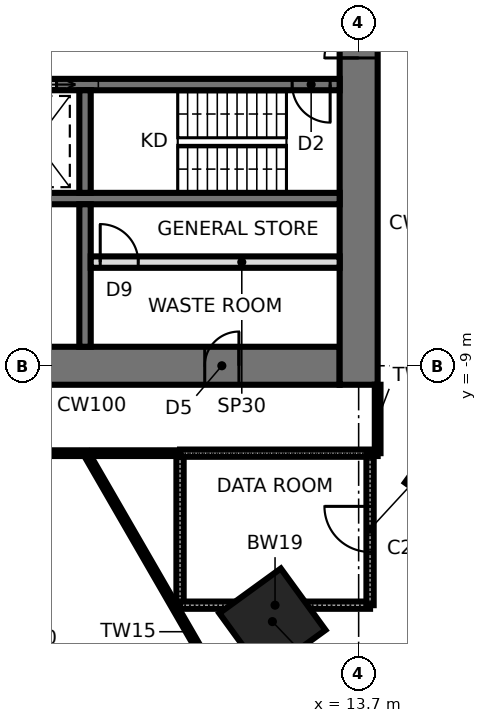
"""IFC4 building model, lengths in metres.
Left out: names, types, materials, properties, quantities, classifications, styles, units other than length and angle.
Written with IfcOpenShell. Run it as: python <this file> out.ifc"""

import sys

from ifc_helpers import new_model, si_unit, direction, frame, frame_2d, origin, origin_2d, place, context, subcontext, project, spatial, rectangle, extrude, element, fill, save


model = new_model("IFC4")
c1 = context("Model", 3, precision=1e-05, world=origin(), true_north=direction((0.0, 1.0)))
c2 = subcontext(c1, "Body", "Model", "MODEL_VIEW")
j1 = project(units=[si_unit("LENGTHUNIT", "METRE"), si_unit("PLANEANGLEUNIT", "RADIAN")], contexts=[c1])
p1 = place(None, origin())
s1 = spatial("IfcSite", under=j1, at=p1, CompositionType="ELEMENT")
p2 = place(p1, origin())
s2 = spatial("IfcBuilding", under=s1, at=p2, CompositionType="ELEMENT")
p3 = place(p2, frame((0.0, 0.0, 78.4)))
s3 = spatial("IfcBuildingStorey", under=s2, at=p3, CompositionType="ELEMENT", Elevation=78.4)
for number, where, z_axis, x_axis in (
    (1, (11.43, -15.733, 0.0), (0.0, 0.0, 1.0), (0.588, -0.809, 0.0)),
    (2, (16.315, -11.854, 0.0), (0.0, 0.0, 1.0), (0.809, -0.588, 0.0)),
):
    element("IfcColumn", number, at=place(p3, frame(where, z_axis=z_axis, x_axis=x_axis)), inside=s3, PredefinedType="COLUMN", context=c2, shape_type="SweptSolid", body=[
        extrude(rectangle(XDim=2.0, YDim=2.0, at=origin_2d()), origin(), (0.0, 0.0, 1.0), 4.2),
    ])
p4 = place(p3, frame((-13.2, -9.0, 0.0), z_axis=(0.0, 0.0, 1.0), x_axis=(1.0, 0.0, 0.0)))
e3 = element("IfcWall", 3, at=p4, inside=s3, PredefinedType="SHEAR", context=c2, shape_type="SweptSolid", body=[
    extrude(rectangle(XDim=26.4, YDim=1.0, at=frame_2d((13.2, 0.0))), origin(), (0.0, 0.0, 1.0), 4.2),
])
p5 = place(p4, frame((2.65, 0.0, 0.0)))
e4 = element("IfcOpeningElement", 4, at=p5, cuts=e3, PredefinedType="OPENING", context=c2, shape_type="SweptSolid", body=[
    extrude(rectangle(XDim=0.9, YDim=2.1, at=frame_2d((0.45, 1.05))), frame((0.0, 0.51, 0.0), z_axis=(0.0, -1.0, 0.0), x_axis=(1.0, 0.0, 0.0)), (0.0, 0.0, 1.0), 1.02),
])
p6 = place(p4, frame((9.5, 0.0, 0.0)))
e5 = element("IfcOpeningElement", 5, at=p6, cuts=e3, PredefinedType="OPENING", context=c2, shape_type="SweptSolid", body=[
    extrude(rectangle(XDim=0.9, YDim=2.1, at=frame_2d((0.45, 1.05))), frame((0.0, 0.51, 0.0), z_axis=(0.0, -1.0, 0.0), x_axis=(1.0, 0.0, 0.0)), (0.0, 0.0, 1.0), 1.02),
])
p7 = place(p4, frame((16.0, 0.0, 0.0)))
e6 = element("IfcOpeningElement", 6, at=p7, cuts=e3, PredefinedType="OPENING", context=c2, shape_type="SweptSolid", body=[
    extrude(rectangle(XDim=0.9, YDim=2.1, at=frame_2d((0.45, 1.05))), frame((0.0, 0.51, 0.0), z_axis=(0.0, -1.0, 0.0), x_axis=(1.0, 0.0, 0.0)), (0.0, 0.0, 1.0), 1.02),
])
p8 = place(p4, frame((22.85, 0.0, 0.0)))
e7 = element("IfcOpeningElement", 7, at=p8, cuts=e3, PredefinedType="OPENING", context=c2, shape_type="SweptSolid", body=[
    extrude(rectangle(XDim=0.9, YDim=2.1, at=frame_2d((0.45, 1.05))), frame((0.0, 0.51, 0.0), z_axis=(0.0, -1.0, 0.0), x_axis=(1.0, 0.0, 0.0)), (0.0, 0.0, 1.0), 1.02),
])
p9 = place(p3, frame((13.7, -9.5, 0.0), z_axis=(0.0, 0.0, 1.0), x_axis=(0.0, 1.0, 0.0)))
e8 = element("IfcWall", 8, at=p9, inside=s3, PredefinedType="SHEAR", context=c2, shape_type="SweptSolid", body=[
    extrude(rectangle(XDim=19.0, YDim=1.0, at=frame_2d((9.5, 0.0))), origin(), (0.0, 0.0, 1.0), 4.2),
])
p10 = place(p9, frame((8.6, 0.0, 0.0)))
e9 = element("IfcOpeningElement", 9, at=p10, cuts=e8, PredefinedType="OPENING", context=c2, shape_type="SweptSolid", body=[
    extrude(rectangle(XDim=1.8, YDim=2.4, at=frame_2d((0.9, 1.2))), frame((0.0, 0.51, 0.0), z_axis=(0.0, -1.0, 0.0), x_axis=(1.0, 0.0, 0.0)), (0.0, 0.0, 1.0), 1.02),
])
p11 = place(p3, frame((-13.2, -1.6, 0.0), z_axis=(0.0, 0.0, 1.0), x_axis=(1.0, 0.0, 0.0)))
e10 = element("IfcWall", 10, at=p11, inside=s3, PredefinedType="SHEAR", context=c2, shape_type="SweptSolid", body=[
    extrude(rectangle(XDim=26.4, YDim=0.3, at=frame_2d((13.2, 0.0))), origin(), (0.0, 0.0, 1.0), 4.2),
])
p12 = place(p11, frame((25.15, 0.0, 0.0)))
e11 = element("IfcOpeningElement", 11, at=p12, cuts=e10, PredefinedType="OPENING", context=c2, shape_type="SweptSolid", body=[
    extrude(rectangle(XDim=1.0, YDim=2.1, at=frame_2d((0.5, 1.05))), frame((0.0, 0.16, 0.0), z_axis=(0.0, -1.0, 0.0), x_axis=(1.0, 0.0, 0.0)), (0.0, 0.0, 1.0), 0.32),
])
p13 = place(p11, frame((15.25, 0.0, 0.0)))
e12 = element("IfcOpeningElement", 12, at=p13, cuts=e10, PredefinedType="OPENING", context=c2, shape_type="SweptSolid", body=[
    extrude(rectangle(XDim=1.1, YDim=2.3, at=frame_2d((0.55, 1.15))), frame((0.0, 0.16, 0.0), z_axis=(0.0, -1.0, 0.0), x_axis=(1.0, 0.0, 0.0)), (0.0, 0.0, 1.0), 0.32),
])
p14 = place(p11, frame((17.85, 0.0, 0.0)))
e13 = element("IfcOpeningElement", 13, at=p14, cuts=e10, PredefinedType="OPENING", context=c2, shape_type="SweptSolid", body=[
    extrude(rectangle(XDim=1.1, YDim=2.3, at=frame_2d((0.55, 1.15))), frame((0.0, 0.16, 0.0), z_axis=(0.0, -1.0, 0.0), x_axis=(1.0, 0.0, 0.0)), (0.0, 0.0, 1.0), 0.32),
])
p15 = place(p11, frame((5.55, 0.0, 0.0)))
e14 = element("IfcOpeningElement", 14, at=p15, cuts=e10, PredefinedType="OPENING", context=c2, shape_type="SweptSolid", body=[
    extrude(rectangle(XDim=0.9, YDim=2.1, at=frame_2d((0.45, 1.05))), frame((0.0, 0.16, 0.0), z_axis=(0.0, -1.0, 0.0), x_axis=(1.0, 0.0, 0.0)), (0.0, 0.0, 1.0), 0.32),
])
p16 = place(p3, frame((-13.2, -4.6, 0.0), z_axis=(0.0, 0.0, 1.0), x_axis=(1.0, 0.0, 0.0)))
e15 = element("IfcWall", 15, at=p16, inside=s3, PredefinedType="SHEAR", context=c2, shape_type="SweptSolid", body=[
    extrude(rectangle(XDim=26.4, YDim=0.3, at=frame_2d((13.2, 0.0))), origin(), (0.0, 0.0, 1.0), 4.2),
])
p17 = place(p3, frame((6.5, -1.75, 0.0), z_axis=(0.0, 0.0, 1.0), x_axis=(0.0, -1.0, 0.0)))
e16 = element("IfcWall", 16, at=p17, inside=s3, PredefinedType="SHEAR", context=c2, shape_type="SweptSolid", body=[
    extrude(rectangle(XDim=2.7, YDim=0.3, at=frame_2d((1.35, 0.0))), origin(), (0.0, 0.0, 1.0), 4.2),
])
p18 = place(p3, frame((6.5, -4.75, 0.0), z_axis=(0.0, 0.0, 1.0), x_axis=(0.0, -1.0, 0.0)))
e17 = element("IfcWall", 17, at=p18, inside=s3, PredefinedType="SHEAR", context=c2, shape_type="SweptSolid", body=[
    extrude(rectangle(XDim=3.75, YDim=0.3, at=frame_2d((1.875, 0.0))), origin(), (0.0, 0.0, 1.0), 4.2),
])
p19 = place(p3, frame((6.65, -6.272, 0.0), z_axis=(0.0, 0.0, 1.0), x_axis=(1.0, 0.0, 0.0)))
e18 = element("IfcWall", 18, at=p19, inside=s3, PredefinedType="PARTITIONING", context=c2, shape_type="SweptSolid", body=[
    extrude(rectangle(XDim=6.55, YDim=0.3, at=frame_2d((3.275, 0.0))), origin(), (0.0, 0.0, 1.0), 4.04),
])
p20 = place(p19, frame((0.25, 0.0, 0.0)))
e19 = element("IfcOpeningElement", 19, at=p20, cuts=e18, PredefinedType="OPENING", context=c2, shape_type="SweptSolid", body=[
    extrude(rectangle(XDim=1.0, YDim=2.4, at=frame_2d((0.5, 1.2))), frame((0.0, 0.16, 0.0), z_axis=(0.0, -1.0, 0.0), x_axis=(1.0, 0.0, 0.0)), (0.0, 0.0, 1.0), 0.32),
])
p21 = place(p3, frame((-16.0, -11.3, 0.0), z_axis=(0.0, 0.0, 1.0), x_axis=(1.0, 0.0, 0.0)))
e20 = element("IfcWall", 20, at=p21, inside=s3, PredefinedType="PARTITIONING", context=c2, shape_type="SweptSolid", body=[
    extrude(rectangle(XDim=25.0, YDim=0.15, at=frame_2d((12.5, 0.0))), origin(), (0.0, 0.0, 1.0), 4.04),
])
p22 = place(p3, frame((11.949, -20.697, 0.0), z_axis=(0.0, 0.0, 1.0), x_axis=(-0.499989292232, 0.866031585829, 0.0)))
e21 = element("IfcWall", 21, at=p22, inside=s3, PredefinedType="PARTITIONING", context=c2, shape_type="SweptSolid", body=[
    extrude(rectangle(XDim=10.85, YDim=0.15, at=frame_2d((5.425, 0.0))), origin(), (0.0, 0.0, 1.0), 4.04),
])
p23 = place(p3, frame((9.0, -11.3, 0.0), z_axis=(0.0, 0.0, 1.0), x_axis=(0.0, -1.0, 0.0)))
e22 = element("IfcWall", 22, at=p23, inside=s3, PredefinedType="SOLIDWALL", context=c2, shape_type="SweptSolid", body=[
    extrude(rectangle(XDim=4.0, YDim=0.19, at=frame_2d((2.0, 0.0))), origin(), (0.0, 0.0, 1.0), 4.04),
])
for number, where, z_axis, x_axis in (
    (23, (9.0, -15.3, 0.0), (0.0, 0.0, 1.0), (1.0, 0.0, 0.0)),
    (24, (14.0, -11.3, 0.0), (0.0, 0.0, 1.0), (-1.0, 0.0, 0.0)),
):
    element("IfcWall", number, at=place(p3, frame(where, z_axis=z_axis, x_axis=x_axis)), inside=s3, PredefinedType="SOLIDWALL", context=c2, shape_type="SweptSolid", body=[
        extrude(rectangle(XDim=5.0, YDim=0.19, at=frame_2d((2.5, 0.0))), origin(), (0.0, 0.0, 1.0), 4.04),
    ])
p24 = place(p3, frame((14.0, -15.3, 0.0), z_axis=(0.0, 0.0, 1.0), x_axis=(0.0, 1.0, 0.0)))
e25 = element("IfcWall", 25, at=p24, inside=s3, PredefinedType="SOLIDWALL", context=c2, shape_type="SweptSolid", body=[
    extrude(rectangle(XDim=4.0, YDim=0.19, at=frame_2d((2.0, 0.0))), origin(), (0.0, 0.0, 1.0), 4.04),
])
p25 = place(p24, frame((1.4, 0.0, 0.0)))
e26 = element("IfcOpeningElement", 26, at=p25, cuts=e25, PredefinedType="OPENING", context=c2, shape_type="SweptSolid", body=[
    extrude(rectangle(XDim=1.2, YDim=2.1, at=frame_2d((0.6, 1.05))), frame((0.0, 0.105, 0.0), z_axis=(0.0, -1.0, 0.0), x_axis=(1.0, 0.0, 0.0)), (0.0, 0.0, 1.0), 0.21),
])
p26 = place(p3, frame((14.0, -11.3, 0.0), z_axis=(0.0, 0.0, 1.0), x_axis=(1.0, 0.0, 0.0)))
e27 = element("IfcWall", 27, at=p26, inside=s3, PredefinedType="PARTITIONING", context=c2, shape_type="SweptSolid", body=[
    extrude(rectangle(XDim=0.2, YDim=0.15, at=frame_2d((0.1, 0.0))), origin(), (0.0, 0.0, 1.0), 4.04),
])
p27 = place(p3, frame((14.2, -11.3, 0.0), z_axis=(0.0, 0.0, 1.0), x_axis=(0.0, 1.0, 0.0)))
e28 = element("IfcWall", 28, at=p27, inside=s3, PredefinedType="PARTITIONING", context=c2, shape_type="SweptSolid", body=[
    extrude(rectangle(XDim=1.8, YDim=0.15, at=frame_2d((0.9, 0.0))), origin(), (0.0, 0.0, 1.0), 4.04),
])
p28 = place(p10, origin())
e29 = element("IfcDoor", 29, at=p28, inside=s3, OperationType="DOUBLE_DOOR_SINGLE_SWING", PredefinedType="DOOR", context=c2, shape_type="SweptSolid", body=[
    extrude(rectangle(XDim=1.72, YDim=2.36, at=frame_2d((0.9, 1.18))), frame((0.0, 0.025, 0.0), z_axis=(0.0, -1.0, 0.0), x_axis=(1.0, 0.0, 0.0)), (0.0, 0.0, 1.0), 0.05),
    extrude(rectangle(XDim=0.04, YDim=2.4, at=frame_2d((0.02, 1.2))), frame((0.0, 0.25, 0.0), z_axis=(0.0, -1.0, 0.0), x_axis=(1.0, 0.0, 0.0)), (0.0, 0.0, 1.0), 0.5),
    extrude(rectangle(XDim=0.04, YDim=2.4, at=frame_2d((1.78, 1.2))), frame((0.0, 0.25, 0.0), z_axis=(0.0, -1.0, 0.0), x_axis=(1.0, 0.0, 0.0)), (0.0, 0.0, 1.0), 0.5),
    extrude(rectangle(XDim=1.72, YDim=0.04, at=frame_2d((0.9, 2.38))), frame((0.0, 0.25, 0.0), z_axis=(0.0, -1.0, 0.0), x_axis=(1.0, 0.0, 0.0)), (0.0, 0.0, 1.0), 0.5),
])
fill(e9, e29)
p29 = place(p12, frame((1.0, 0.0, 0.0), z_axis=(0.0, 0.0, 1.0), x_axis=(-1.0, 0.0, 0.0)))
e30 = element("IfcDoor", 30, at=p29, inside=s3, OperationType="SINGLE_SWING_LEFT", PredefinedType="DOOR", context=c2, shape_type="SweptSolid", body=[
    extrude(rectangle(XDim=1.0, YDim=2.1, at=frame_2d((0.5, 1.05))), frame((0.0, 0.025, 0.0), z_axis=(0.0, -1.0, 0.0), x_axis=(1.0, 0.0, 0.0)), (0.0, 0.0, 1.0), 0.05),
])
fill(e11, e30)
p30 = place(p14, frame((1.1, 0.0, 0.0), z_axis=(0.0, 0.0, 1.0), x_axis=(-1.0, 0.0, 0.0)))
e31 = element("IfcDoor", 31, at=p30, inside=s3, OperationType="SLIDING_TO_LEFT", PredefinedType="DOOR", context=c2, shape_type="SweptSolid", body=[
    extrude(rectangle(XDim=1.1, YDim=2.3, at=frame_2d((0.55, 1.15))), frame((0.0, 0.025, 0.0), z_axis=(0.0, -1.0, 0.0), x_axis=(1.0, 0.0, 0.0)), (0.0, 0.0, 1.0), 0.05),
])
fill(e13, e31)
p31 = place(p8, origin())
e32 = element("IfcDoor", 32, at=p31, inside=s3, OperationType="SINGLE_SWING_RIGHT", PredefinedType="DOOR", context=c2, shape_type="SweptSolid", body=[
    extrude(rectangle(XDim=0.82, YDim=2.06, at=frame_2d((0.45, 1.03))), frame((0.0, 0.025, 0.0), z_axis=(0.0, -1.0, 0.0), x_axis=(1.0, 0.0, 0.0)), (0.0, 0.0, 1.0), 0.05),
    extrude(rectangle(XDim=0.04, YDim=2.1, at=frame_2d((0.02, 1.05))), frame((0.0, 0.25, 0.0), z_axis=(0.0, -1.0, 0.0), x_axis=(1.0, 0.0, 0.0)), (0.0, 0.0, 1.0), 0.5),
    extrude(rectangle(XDim=0.04, YDim=2.1, at=frame_2d((0.88, 1.05))), frame((0.0, 0.25, 0.0), z_axis=(0.0, -1.0, 0.0), x_axis=(1.0, 0.0, 0.0)), (0.0, 0.0, 1.0), 0.5),
    extrude(rectangle(XDim=0.82, YDim=0.04, at=frame_2d((0.45, 2.08))), frame((0.0, 0.25, 0.0), z_axis=(0.0, -1.0, 0.0), x_axis=(1.0, 0.0, 0.0)), (0.0, 0.0, 1.0), 0.5),
])
fill(e7, e32)
p32 = place(p20, origin())
e33 = element("IfcDoor", 33, at=p32, inside=s3, OperationType="SINGLE_SWING_LEFT", PredefinedType="DOOR", context=c2, shape_type="SweptSolid", body=[
    extrude(rectangle(XDim=1.0, YDim=2.4, at=frame_2d((0.5, 1.2))), frame((0.0, 0.025, 0.0), z_axis=(0.0, -1.0, 0.0), x_axis=(1.0, 0.0, 0.0)), (0.0, 0.0, 1.0), 0.05),
])
fill(e19, e33)
p33 = place(p25, origin())
e34 = element("IfcDoor", 34, at=p33, inside=s3, OperationType="SINGLE_SWING_RIGHT", PredefinedType="DOOR", context=c2, shape_type="SweptSolid", body=[
    extrude(rectangle(XDim=1.2, YDim=2.1, at=frame_2d((0.6, 1.05))), frame((0.0, 0.025, 0.0), z_axis=(0.0, -1.0, 0.0), x_axis=(1.0, 0.0, 0.0)), (0.0, 0.0, 1.0), 0.05),
])
fill(e26, e34)
save(model, sys.argv[1])
